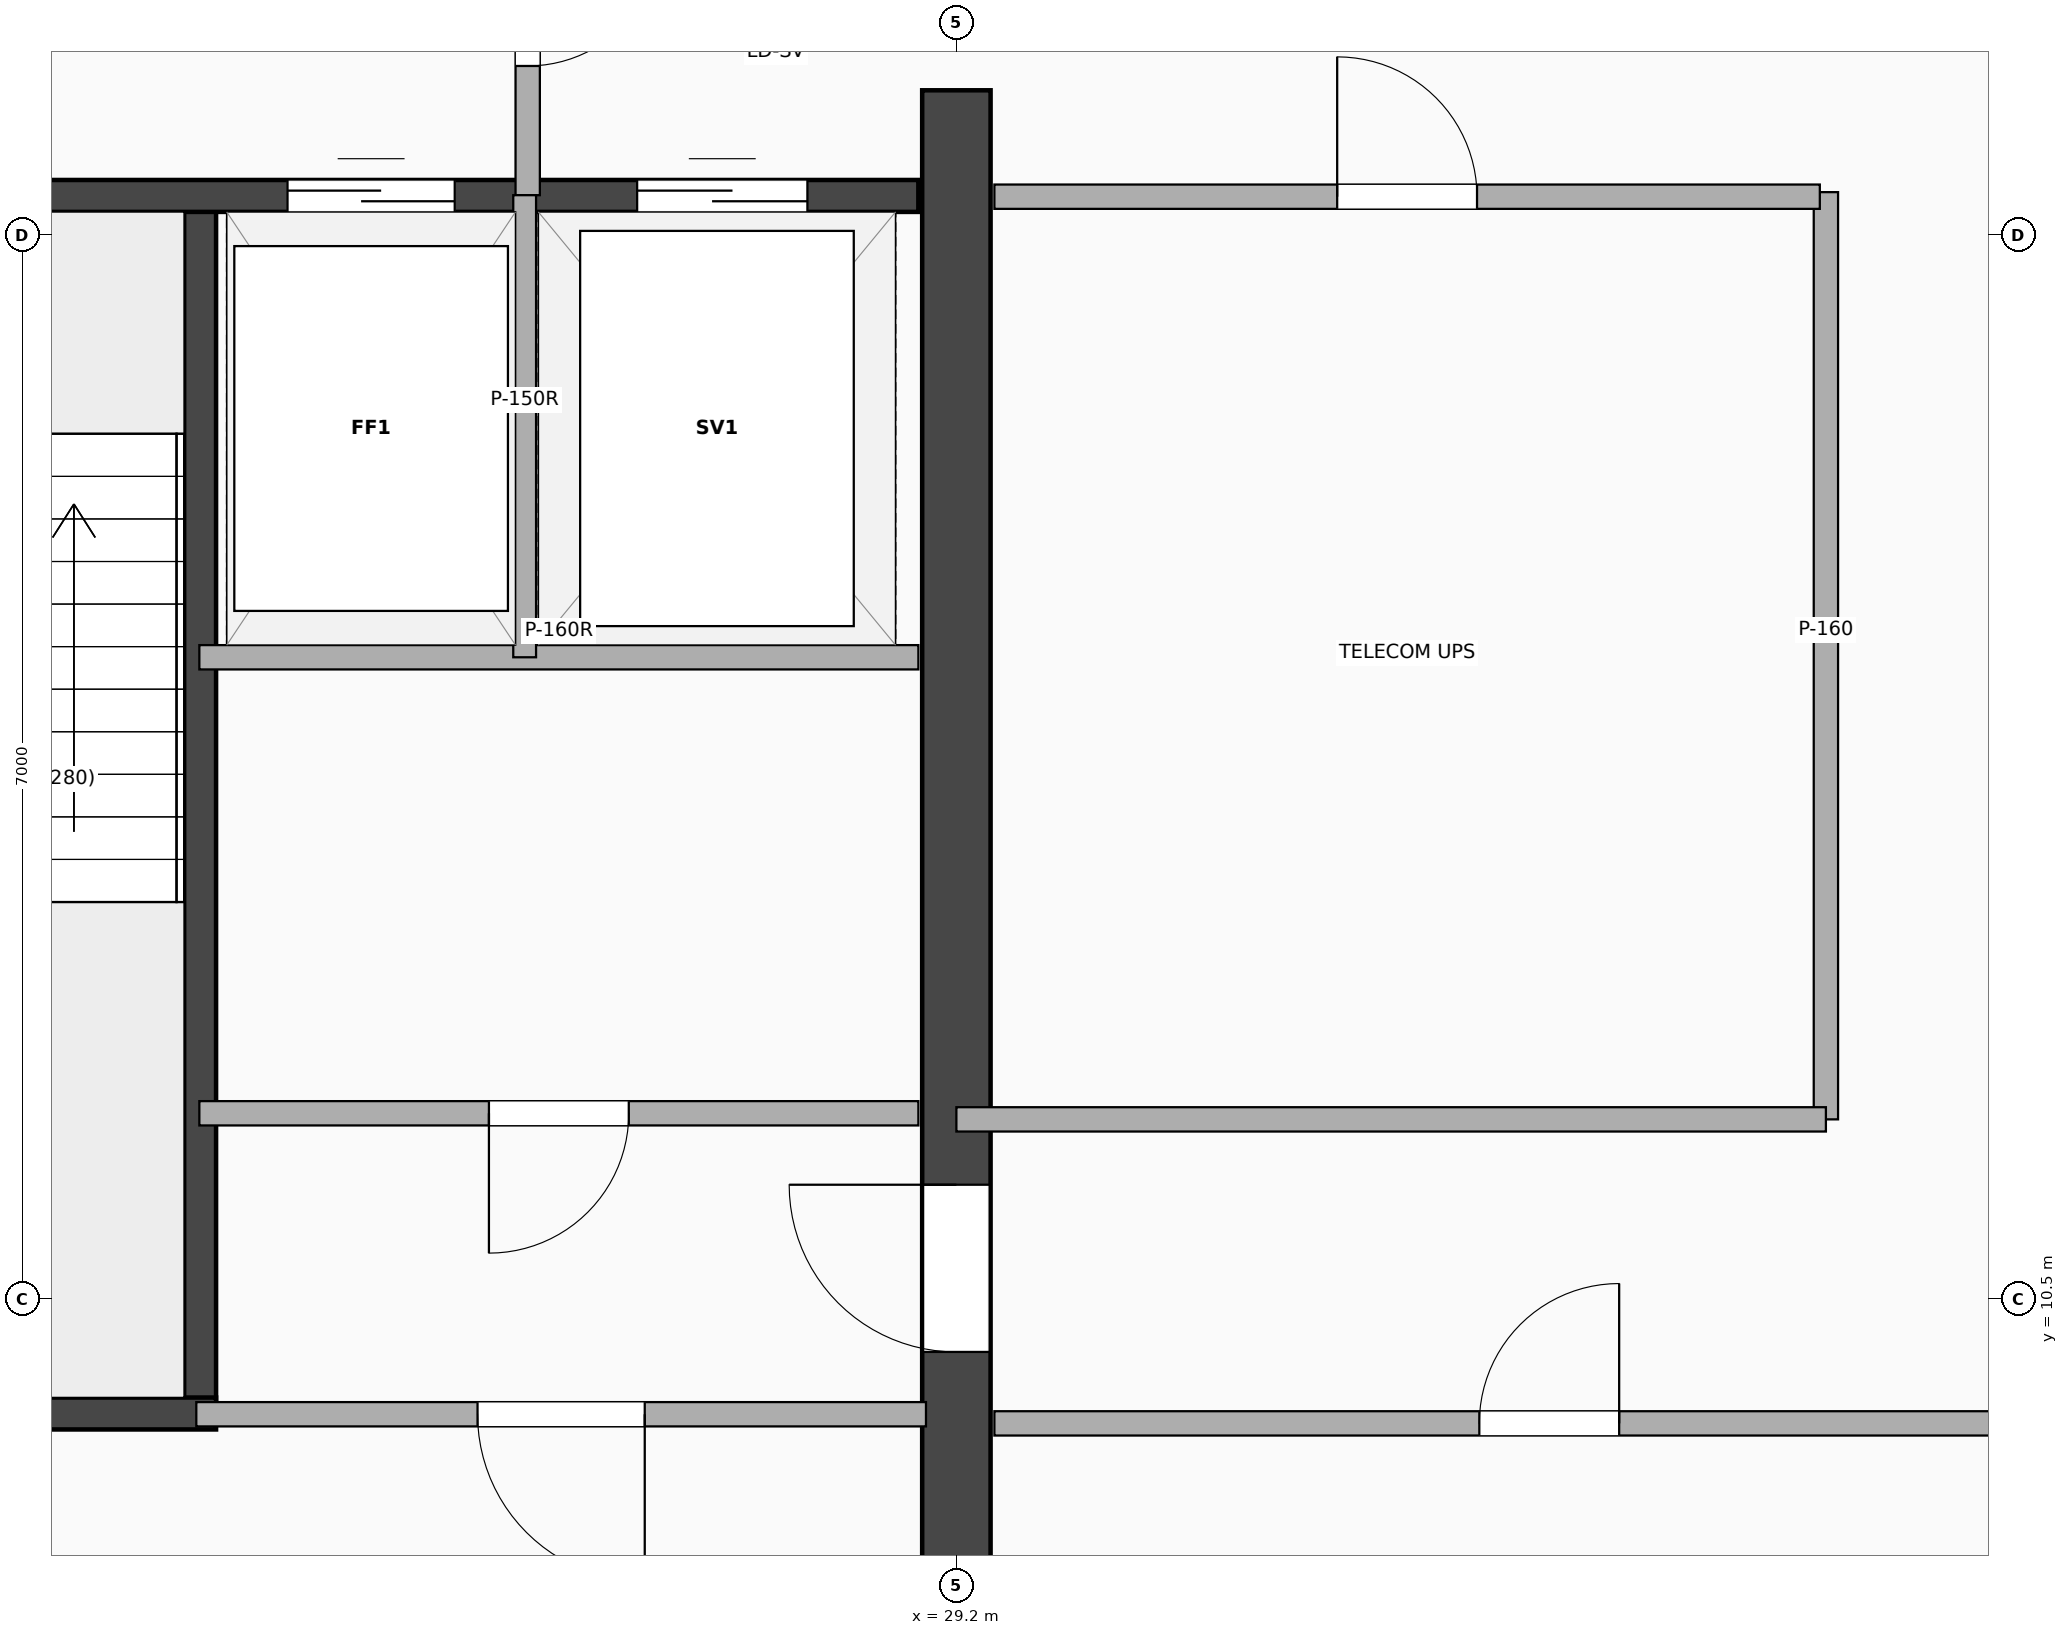
"""IFC4 building model, lengths in metres.
Left out: names, types, materials, properties, quantities, classifications, styles, units other than length and angle.
Written with IfcOpenShell. Run it as: python <this file> out.ifc"""

import sys

from ifc_helpers import new_model, si_unit, direction, frame, frame_2d, origin, place, context, subcontext, project, spatial, rectangle, extrude, element, fill, save


model = new_model("IFC4")
c1 = context("Model", 3, precision=1e-05, world=origin(), true_north=direction((0.0, 1.0)))
c2 = subcontext(c1, "Body", "Model", "MODEL_VIEW")
j1 = project(units=[si_unit("LENGTHUNIT", "METRE"), si_unit("PLANEANGLEUNIT", "RADIAN")], contexts=[c1])
p1 = place(None, origin())
s1 = spatial("IfcSite", under=j1, at=p1, CompositionType="ELEMENT")
p2 = place(p1, origin())
s2 = spatial("IfcBuilding", under=s1, at=p2, CompositionType="ELEMENT")
p3 = place(p2, frame((0.0, 0.0, 184.1)))
s3 = spatial("IfcBuildingStorey", under=s2, at=p3, CompositionType="ELEMENT", Elevation=184.1)
p4 = place(p3, frame((29.2, 3.5, 0.0), z_axis=(0.0, 0.0, 1.0), x_axis=(0.0, 1.0, 0.0)))
e1 = element("IfcWall", 1, at=p4, inside=s3, PredefinedType="SHEAR", context=c2, shape_type="SweptSolid", body=[
    extrude(rectangle(XDim=14.95, YDim=0.45, at=frame_2d((7.475, 0.0))), origin(), (0.0, 0.0, 1.0), 8.16),
])
p5 = place(p4, frame((7.75, 0.0, 0.0), z_axis=(0.0, 0.0, 1.0), x_axis=(-1.0, 0.0, 0.0)))
e2 = element("IfcOpeningElement", 2, at=p5, cuts=e1, PredefinedType="OPENING", context=c2, shape_type="SweptSolid", body=[
    extrude(rectangle(XDim=1.1, YDim=2.15, at=frame_2d((0.55, 1.075))), frame((0.0, 0.235, 0.0), z_axis=(0.0, -1.0, 0.0), x_axis=(1.0, 0.0, 0.0)), (0.0, 0.0, 1.0), 0.47),
])
p6 = place(p3, frame((24.225, 9.745, 0.0), z_axis=(0.0, 0.0, 1.0), x_axis=(0.0, 1.0, 0.0)))
e3 = element("IfcWall", 3, at=p6, inside=s3, PredefinedType="SHEAR", context=c2, shape_type="SweptSolid", body=[
    extrude(rectangle(XDim=8.01, YDim=0.21, at=frame_2d((4.005, 0.0))), origin(), (0.0, 0.0, 1.0), 8.16),
])
p7 = place(p3, frame((20.67, 9.745, 0.0), z_axis=(0.0, 0.0, 1.0), x_axis=(1.0, 0.0, 0.0)))
e4 = element("IfcWall", 4, at=p7, inside=s3, PredefinedType="SHEAR", context=c2, shape_type="SweptSolid", body=[
    extrude(rectangle(XDim=3.66, YDim=0.21, at=frame_2d((1.83, 0.0))), origin(), (0.0, 0.0, 1.0), 8.16),
])
p8 = place(p3, frame((20.65, 17.755, 0.0), z_axis=(0.0, 0.0, 1.0), x_axis=(1.0, 0.0, 0.0)))
e5 = element("IfcWall", 5, at=p8, inside=s3, PredefinedType="SHEAR", context=c2, shape_type="SweptSolid", body=[
    extrude(rectangle(XDim=8.3, YDim=0.21, at=frame_2d((4.15, 0.0))), origin(), (0.0, 0.0, 1.0), 8.16),
])
p9 = place(p8, frame((2.2, 0.0, 0.0), z_axis=(0.0, 0.0, 1.0), x_axis=(-1.0, 0.0, 0.0)))
e6 = element("IfcOpeningElement", 6, at=p9, cuts=e5, PredefinedType="OPENING", context=c2, shape_type="SweptSolid", body=[
    extrude(rectangle(XDim=1.05, YDim=2.15, at=frame_2d((0.525, 1.075))), frame((0.0, 0.115, 0.0), z_axis=(0.0, -1.0, 0.0), x_axis=(1.0, 0.0, 0.0)), (0.0, 0.0, 1.0), 0.23),
])
p10 = place(p8, frame((4.15, 0.0, 0.0)))
e7 = element("IfcOpeningElement", 7, at=p10, cuts=e5, PredefinedType="OPENING", context=c2, shape_type="SweptSolid", body=[
    extrude(rectangle(XDim=1.1, YDim=2.18, at=frame_2d((0.55, 1.09))), frame((0.0, 0.115, 0.0), z_axis=(0.0, -1.0, 0.0), x_axis=(1.0, 0.0, 0.0)), (0.0, 0.0, 1.0), 0.23),
])
p11 = place(p8, frame((6.45, 0.0, 0.0)))
e8 = element("IfcOpeningElement", 8, at=p11, cuts=e5, PredefinedType="OPENING", context=c2, shape_type="SweptSolid", body=[
    extrude(rectangle(XDim=1.12, YDim=2.2, at=frame_2d((0.56, 1.1))), frame((0.0, 0.115, 0.0), z_axis=(0.0, -1.0, 0.0), x_axis=(1.0, 0.0, 0.0)), (0.0, 0.0, 1.0), 0.23),
])
p12 = place(p3, frame((26.38, 17.76, 0.0), z_axis=(0.0, 0.0, 1.0), x_axis=(0.0, 1.0, 0.0)))
e9 = element("IfcWall", 9, at=p12, inside=s3, PredefinedType="PARTITIONING", context=c2, shape_type="SweptSolid", body=[
    extrude(rectangle(XDim=2.66, YDim=0.16, at=frame_2d((1.33, 0.0))), origin(), (0.0, 0.0, 1.0), 7.602),
])
p13 = place(p12, frame((0.85, 0.0, 0.0)))
e10 = element("IfcOpeningElement", 10, at=p13, cuts=e9, PredefinedType="OPENING", context=c2, shape_type="SweptSolid", body=[
    extrude(rectangle(XDim=0.88, YDim=2.08, at=frame_2d((0.44, 1.04))), frame((0.0, 0.09, 0.0), z_axis=(0.0, -1.0, 0.0), x_axis=(1.0, 0.0, 0.0)), (0.0, 0.0, 1.0), 0.18),
])
p14 = place(p3, frame((24.22, 14.72, 0.0), z_axis=(0.0, 0.0, 1.0), x_axis=(1.0, 0.0, 0.0)))
e11 = element("IfcWall", 11, at=p14, inside=s3, PredefinedType="PARTITIONING", context=c2, shape_type="SweptSolid", body=[
    extrude(rectangle(XDim=4.73, YDim=0.16, at=frame_2d((2.365, 0.0))), origin(), (0.0, 0.0, 1.0), 8.16),
])
p15 = place(p3, frame((26.36, 14.72, 0.0), z_axis=(0.0, 0.0, 1.0), x_axis=(0.0, 1.0, 0.0)))
e12 = element("IfcWall", 12, at=p15, inside=s3, PredefinedType="PARTITIONING", context=c2, shape_type="SweptSolid", body=[
    extrude(rectangle(XDim=3.04, YDim=0.15, at=frame_2d((1.52, 0.0))), origin(), (0.0, 0.0, 1.0), 8.16),
])
p16 = place(p3, frame((24.22, 11.72, 0.0), z_axis=(0.0, 0.0, 1.0), x_axis=(1.0, 0.0, 0.0)))
e13 = element("IfcWall", 13, at=p16, inside=s3, PredefinedType="PARTITIONING", context=c2, shape_type="SweptSolid", body=[
    extrude(rectangle(XDim=4.73, YDim=0.16, at=frame_2d((2.365, 0.0))), origin(), (0.0, 0.0, 1.0), 8.16),
])
p17 = place(p16, frame((1.905, 0.0, 0.0)))
e14 = element("IfcOpeningElement", 14, at=p17, cuts=e13, PredefinedType="OPENING", context=c2, shape_type="SweptSolid", body=[
    extrude(rectangle(XDim=0.92, YDim=2.08, at=frame_2d((0.46, 1.04))), frame((0.0, 0.09, 0.0), z_axis=(0.0, -1.0, 0.0), x_axis=(1.0, 0.0, 0.0)), (0.0, 0.0, 1.0), 0.18),
])
p18 = place(p3, frame((24.2, 9.74, 0.0), z_axis=(0.0, 0.0, 1.0), x_axis=(1.0, 0.0, 0.0)))
e15 = element("IfcWall", 15, at=p18, inside=s3, PredefinedType="PARTITIONING", context=c2, shape_type="SweptSolid", body=[
    extrude(rectangle(XDim=4.8, YDim=0.16, at=frame_2d((2.4, 0.0))), origin(), (0.0, 0.0, 1.0), 8.16),
])
p19 = place(p18, frame((1.85, 0.0, 0.0)))
e16 = element("IfcOpeningElement", 16, at=p19, cuts=e15, PredefinedType="OPENING", context=c2, shape_type="SweptSolid", body=[
    extrude(rectangle(XDim=1.1, YDim=2.15, at=frame_2d((0.55, 1.075))), frame((0.0, 0.09, 0.0), z_axis=(0.0, -1.0, 0.0), x_axis=(1.0, 0.0, 0.0)), (0.0, 0.0, 1.0), 0.18),
])
p20 = place(p3, frame((34.92, 11.68, 0.0), z_axis=(0.0, 0.0, 1.0), x_axis=(0.0, 1.0, 0.0)))
e17 = element("IfcWall", 17, at=p20, inside=s3, PredefinedType="PARTITIONING", context=c2, shape_type="SweptSolid", body=[
    extrude(rectangle(XDim=6.1, YDim=0.16, at=frame_2d((3.05, 0.0))), origin(), (0.0, 0.0, 1.0), 8.16),
])
p21 = place(p3, frame((29.45, 9.68, 0.0), z_axis=(0.0, 0.0, 1.0), x_axis=(1.0, 0.0, 0.0)))
e18 = element("IfcWall", 18, at=p21, inside=s3, PredefinedType="PARTITIONING", context=c2, shape_type="SweptSolid", body=[
    extrude(rectangle(XDim=7.3, YDim=0.16, at=frame_2d((3.65, 0.0))), origin(), (0.0, 0.0, 1.0), 8.16),
])
p22 = place(p21, frame((4.11, 0.0, 0.0), z_axis=(0.0, 0.0, 1.0), x_axis=(-1.0, 0.0, 0.0)))
e19 = element("IfcOpeningElement", 19, at=p22, cuts=e18, PredefinedType="OPENING", context=c2, shape_type="SweptSolid", body=[
    extrude(rectangle(XDim=0.92, YDim=2.08, at=frame_2d((0.46, 1.04))), frame((0.0, 0.09, 0.0), z_axis=(0.0, -1.0, 0.0), x_axis=(1.0, 0.0, 0.0)), (0.0, 0.0, 1.0), 0.18),
])
p23 = place(p3, frame((29.2, 11.68, 0.0), z_axis=(0.0, 0.0, 1.0), x_axis=(1.0, 0.0, 0.0)))
e20 = element("IfcWall", 20, at=p23, inside=s3, PredefinedType="PARTITIONING", context=c2, shape_type="SweptSolid", body=[
    extrude(rectangle(XDim=5.72, YDim=0.16, at=frame_2d((2.86, 0.0))), origin(), (0.0, 0.0, 1.0), 8.16),
])
p24 = place(p3, frame((29.45, 17.75, 0.0), z_axis=(0.0, 0.0, 1.0), x_axis=(1.0, 0.0, 0.0)))
e21 = element("IfcWall", 21, at=p24, inside=s3, PredefinedType="PARTITIONING", context=c2, shape_type="SweptSolid", body=[
    extrude(rectangle(XDim=5.43, YDim=0.16, at=frame_2d((2.715, 0.0))), origin(), (0.0, 0.0, 1.0), 8.16),
])
p25 = place(p24, frame((3.175, 0.0, 0.0), z_axis=(0.0, 0.0, 1.0), x_axis=(-1.0, 0.0, 0.0)))
e22 = element("IfcOpeningElement", 22, at=p25, cuts=e21, PredefinedType="OPENING", context=c2, shape_type="SweptSolid", body=[
    extrude(rectangle(XDim=0.92, YDim=2.08, at=frame_2d((0.46, 1.04))), frame((0.0, 0.09, 0.0), z_axis=(0.0, -1.0, 0.0), x_axis=(1.0, 0.0, 0.0)), (0.0, 0.0, 1.0), 0.18),
])
p26 = place(p10, origin())
e23 = element("IfcDoor", 23, at=p26, inside=s3, OperationType="DOUBLE_DOOR_SLIDING", PredefinedType="DOOR", context=c2, shape_type="SweptSolid", body=[
    extrude(rectangle(XDim=1.1, YDim=2.18, at=frame_2d((0.55, 1.09))), frame((0.0, 0.025, 0.0), z_axis=(0.0, -1.0, 0.0), x_axis=(1.0, 0.0, 0.0)), (0.0, 0.0, 1.0), 0.05),
])
fill(e7, e23)
p27 = place(p11, origin())
e24 = element("IfcDoor", 24, at=p27, inside=s3, OperationType="DOUBLE_DOOR_SLIDING", PredefinedType="DOOR", context=c2, shape_type="SweptSolid", body=[
    extrude(rectangle(XDim=1.12, YDim=2.2, at=frame_2d((0.56, 1.1))), frame((0.0, 0.025, 0.0), z_axis=(0.0, -1.0, 0.0), x_axis=(1.0, 0.0, 0.0)), (0.0, 0.0, 1.0), 0.05),
])
fill(e8, e24)
p28 = place(p5, origin())
e25 = element("IfcDoor", 25, at=p28, inside=s3, OperationType="SINGLE_SWING_RIGHT", PredefinedType="DOOR", context=c2, shape_type="SweptSolid", body=[
    extrude(rectangle(XDim=1.1, YDim=2.15, at=frame_2d((0.55, 1.075))), frame((0.0, 0.025, 0.0), z_axis=(0.0, -1.0, 0.0), x_axis=(1.0, 0.0, 0.0)), (0.0, 0.0, 1.0), 0.05),
])
fill(e2, e25)
p29 = place(p13, origin())
e26 = element("IfcDoor", 26, at=p29, inside=s3, OperationType="SINGLE_SWING_RIGHT", PredefinedType="DOOR", context=c2, shape_type="SweptSolid", body=[
    extrude(rectangle(XDim=0.88, YDim=2.08, at=frame_2d((0.44, 1.04))), frame((0.0, 0.025, 0.0), z_axis=(0.0, -1.0, 0.0), x_axis=(1.0, 0.0, 0.0)), (0.0, 0.0, 1.0), 0.05),
])
fill(e10, e26)
p30 = place(p17, origin())
e27 = element("IfcDoor", 27, at=p30, inside=s3, OperationType="SINGLE_SWING_LEFT", PredefinedType="DOOR", context=c2, shape_type="SweptSolid", body=[
    extrude(rectangle(XDim=0.92, YDim=2.08, at=frame_2d((0.46, 1.04))), frame((0.0, 0.025, 0.0), z_axis=(0.0, -1.0, 0.0), x_axis=(1.0, 0.0, 0.0)), (0.0, 0.0, 1.0), 0.05),
])
fill(e14, e27)
p31 = place(p19, origin())
e28 = element("IfcDoor", 28, at=p31, inside=s3, OperationType="SINGLE_SWING_RIGHT", PredefinedType="DOOR", context=c2, shape_type="SweptSolid", body=[
    extrude(rectangle(XDim=1.1, YDim=2.15, at=frame_2d((0.55, 1.075))), frame((0.0, 0.025, 0.0), z_axis=(0.0, -1.0, 0.0), x_axis=(1.0, 0.0, 0.0)), (0.0, 0.0, 1.0), 0.05),
])
fill(e16, e28)
p32 = place(p22, origin())
e29 = element("IfcDoor", 29, at=p32, inside=s3, OperationType="SINGLE_SWING_RIGHT", PredefinedType="DOOR", context=c2, shape_type="SweptSolid", body=[
    extrude(rectangle(XDim=0.92, YDim=2.08, at=frame_2d((0.46, 1.04))), frame((0.0, 0.025, 0.0), z_axis=(0.0, -1.0, 0.0), x_axis=(1.0, 0.0, 0.0)), (0.0, 0.0, 1.0), 0.05),
])
fill(e19, e29)
p33 = place(p25, origin())
e30 = element("IfcDoor", 30, at=p33, inside=s3, OperationType="SINGLE_SWING_LEFT", PredefinedType="DOOR", context=c2, shape_type="SweptSolid", body=[
    extrude(rectangle(XDim=0.92, YDim=2.08, at=frame_2d((0.46, 1.04))), frame((0.0, 0.025, 0.0), z_axis=(0.0, -1.0, 0.0), x_axis=(1.0, 0.0, 0.0)), (0.0, 0.0, 1.0), 0.05),
])
fill(e22, e30)
save(model, sys.argv[1])
